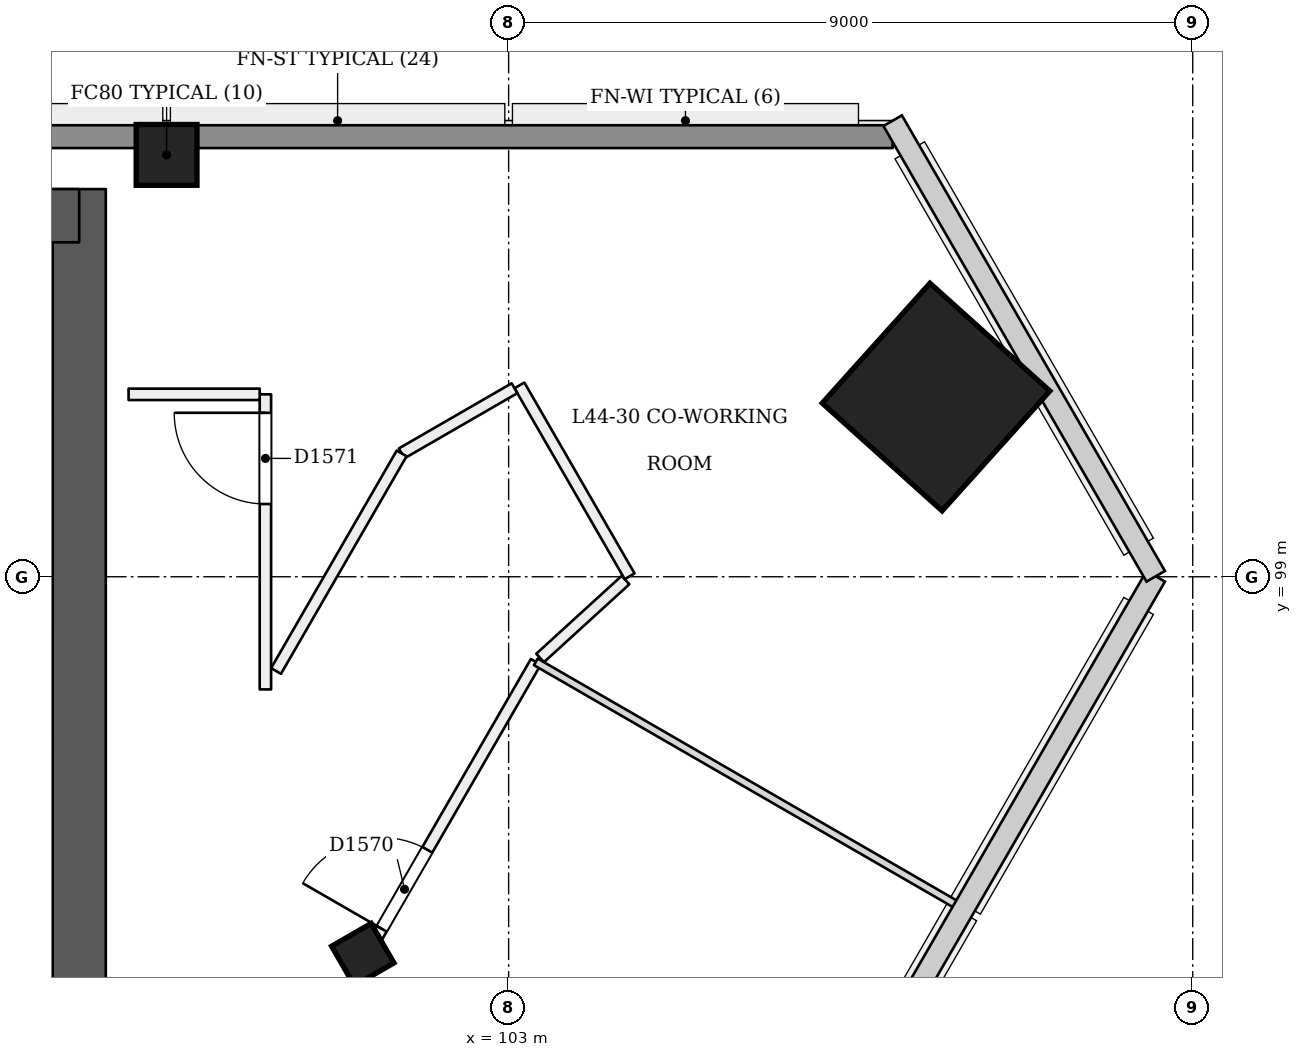
"""IFC4 building model, lengths in metres.
Left out: names, types, materials, properties, quantities, classifications, styles, units other than length and angle.
Written with IfcOpenShell. Run it as: python <this file> out.ifc"""

import sys

from ifc_helpers import new_model, si_unit, direction, frame, frame_2d, origin, origin_2d, place, context, subcontext, project, spatial, rectangle, extrude, element, fill, save


model = new_model("IFC4")
c1 = context("Model", 3, precision=1e-05, world=origin(), true_north=direction((0.0, 1.0)))
c2 = subcontext(c1, "Body", "Model", "MODEL_VIEW")
j1 = project(units=[si_unit("LENGTHUNIT", "METRE"), si_unit("PLANEANGLEUNIT", "RADIAN")], contexts=[c1])
p1 = place(None, origin())
s1 = spatial("IfcSite", under=j1, at=p1, CompositionType="ELEMENT")
p2 = place(p1, origin())
s2 = spatial("IfcBuilding", under=s1, at=p2, CompositionType="ELEMENT")
p3 = place(p2, frame((0.0, 0.0, 171.0)))
s3 = spatial("IfcBuildingStorey", under=s2, at=p3, CompositionType="ELEMENT", Elevation=171.0)
p4 = place(p3, frame((97.35, 93.05, 0.0), z_axis=(0.0, 0.0, 1.0), x_axis=(0.0, 1.0, 0.0)))
e1 = element("IfcWall", 1, at=p4, inside=s3, PredefinedType="SHEAR", context=c2, shape_type="SweptSolid", body=[
    extrude(rectangle(XDim=11.05, YDim=0.7, at=frame_2d((5.525, 0.0))), origin(), (0.0, 0.0, 1.0), 3.6),
])
p5 = place(p3, frame((97.35, 103.75, 0.0), z_axis=(0.0, 0.0, 1.0), x_axis=(-1.0, 0.0, 0.0)))
e2 = element("IfcWall", 2, at=p5, inside=s3, PredefinedType="SHEAR", context=c2, shape_type="SweptSolid", body=[
    extrude(rectangle(XDim=25.05, YDim=0.7, at=frame_2d((12.525, 0.0))), origin(), (0.0, 0.0, 1.0), 3.6),
])
p6 = place(p3, frame((101.108, 93.982, -0.018), z_axis=(-0.022153634206, 0.038480930364, 0.999013730882), x_axis=(-0.501317534198, -0.86497852137, 0.022201069202)))
e3 = element("IfcColumn", 3, at=p6, inside=s3, PredefinedType="COLUMN", context=c2, shape_type="SweptSolid", body=[
    extrude(rectangle(XDim=0.6, YDim=0.6, at=origin_2d()), origin(), (0.0, 0.0, 1.0), 3.604),
])
p7 = place(p3, frame((108.657, 101.353, 0.0), z_axis=(-0.028401796786, 0.009286506348, 0.999553449666), x_axis=(0.498881183205, -0.866385379601, 0.022224739778)))
e4 = element("IfcColumn", 4, at=p7, inside=s3, PredefinedType="COLUMN", context=c2, shape_type="SweptSolid", body=[
    extrude(rectangle(XDim=2.12, YDim=2.12, at=origin_2d()), origin(), (0.0, 0.0, 1.0), 3.602),
])
p8 = place(p3, frame((98.5, 104.55, 0.0), z_axis=(0.0, 0.0, 1.0), x_axis=(1.0, 0.0, 0.0)))
e5 = element("IfcColumn", 5, at=p8, inside=s3, PredefinedType="COLUMN", context=c2, shape_type="SweptSolid", body=[
    extrude(rectangle(XDim=0.8, YDim=0.8, at=origin_2d()), origin(), (0.0, 0.0, 1.0), 3.6),
])
p9 = place(p3, frame((99.8, 91.718, 0.0), z_axis=(0.0, 0.0, 1.0), x_axis=(0.499976887781, 0.866038747219, 0.0)))
e6 = element("IfcWall", 6, at=p9, inside=s3, PredefinedType="PARTITIONING", context=c2, shape_type="SweptSolid", body=[
    extrude(rectangle(XDim=7.115, YDim=0.15, at=frame_2d((3.558, 0.0))), origin(), (0.0, 0.0, 1.0), 2.75),
])
p10 = place(p9, frame((3.061, 0.0, 0.0)))
e7 = element("IfcOpeningElement", 7, at=p10, cuts=e6, PredefinedType="OPENING", context=c2, shape_type="SweptSolid", body=[
    extrude(rectangle(XDim=1.2, YDim=2.1, at=frame_2d((0.6, 1.05))), frame((0.0, 0.085, 0.0), z_axis=(0.0, -1.0, 0.0), x_axis=(1.0, 0.0, 0.0)), (0.0, 0.0, 1.0), 0.171),
])
p11 = place(p3, frame((103.414, 97.932, 0.0), z_axis=(0.0, 0.0, 1.0), x_axis=(0.73878425035, 0.673942008955, 0.0)))
e8 = element("IfcWall", 8, at=p11, inside=s3, PredefinedType="PARTITIONING", context=c2, shape_type="SweptSolid", body=[
    extrude(rectangle(XDim=1.521, YDim=0.15, at=frame_2d((0.761, 0.0))), origin(), (0.0, 0.0, 1.0), 3.15),
])
p12 = place(p3, frame((104.592, 99.006, 0.0), z_axis=(0.0, 0.0, 1.0), x_axis=(-0.499987231761, 0.866032775405, 0.0)))
e9 = element("IfcWall", 9, at=p12, inside=s3, PredefinedType="PARTITIONING", context=c2, shape_type="SweptSolid", body=[
    extrude(rectangle(XDim=2.9, YDim=0.15, at=frame_2d((1.45, 0.0))), origin(), (0.0, 0.0, 1.0), 3.15),
])
p13 = place(p3, frame((103.077, 101.48, 0.0), z_axis=(0.0, 0.0, 1.0), x_axis=(-0.866078867041, -0.499907387488, 0.0)))
e10 = element("IfcWall", 10, at=p13, inside=s3, PredefinedType="PARTITIONING", context=c2, shape_type="SweptSolid", body=[
    extrude(rectangle(XDim=1.714, YDim=0.15, at=frame_2d((0.857, 0.0))), origin(), (0.0, 0.0, 1.0), 3.15),
])
p14 = place(p3, frame((101.593, 100.623, 0.0), z_axis=(0.0, 0.0, 1.0), x_axis=(-0.499976073514, -0.866039217307, 0.0)))
e11 = element("IfcWall", 11, at=p14, inside=s3, PredefinedType="PARTITIONING", context=c2, shape_type="SweptSolid", body=[
    extrude(rectangle(XDim=3.305, YDim=0.15, at=frame_2d((1.653, 0.0))), origin(), (0.0, 0.0, 1.0), 3.15),
])
p15 = place(p3, frame((99.8, 97.518, 0.0), z_axis=(0.0, 0.0, 1.0), x_axis=(0.0, 1.0, 0.0)))
e12 = element("IfcWall", 12, at=p15, inside=s3, PredefinedType="PARTITIONING", context=c2, shape_type="SweptSolid", body=[
    extrude(rectangle(XDim=3.882, YDim=0.15, at=frame_2d((1.941, 0.0))), origin(), (0.0, 0.0, 1.0), 3.15),
])
p16 = place(p15, frame((2.439, 0.0, 0.0)))
e13 = element("IfcOpeningElement", 13, at=p16, cuts=e12, PredefinedType="OPENING", context=c2, shape_type="SweptSolid", body=[
    extrude(rectangle(XDim=1.2, YDim=2.1, at=frame_2d((0.6, 1.05))), frame((0.0, 0.085, 0.0), z_axis=(0.0, -1.0, 0.0), x_axis=(1.0, 0.0, 0.0)), (0.0, 0.0, 1.0), 0.171),
])
p17 = place(p3, frame((99.725, 101.4, 0.0), z_axis=(0.0, 0.0, 1.0), x_axis=(-1.0, 0.0, 0.0)))
e14 = element("IfcWall", 14, at=p17, inside=s3, PredefinedType="PARTITIONING", context=c2, shape_type="SweptSolid", body=[
    extrude(rectangle(XDim=1.725, YDim=0.15, at=frame_2d((0.863, 0.0))), origin(), (0.0, 0.0, 1.0), 3.15),
])
p18 = place(p3, frame((108.918, 94.67, 0.0), z_axis=(0.0, 0.0, 1.0), x_axis=(-0.866018406147, 0.500012120068, 0.0)))
e15 = element("IfcWall", 15, at=p18, inside=s3, PredefinedType="PARTITIONING", context=c2, shape_type="SweptSolid", body=[
    extrude(rectangle(XDim=6.42, YDim=0.1, at=frame_2d((3.21, 0.0))), origin(), (0.0, 0.0, 1.0), 2.65),
])
p19 = place(p3, frame((61.947, 104.79, 0.0), z_axis=(0.0, 0.0, 1.0), x_axis=(1.0, 0.0, 0.0)))
e16 = element("IfcWall", 16, at=p19, inside=s3, PredefinedType="SOLIDWALL", context=c2, shape_type="SweptSolid", body=[
    extrude(rectangle(XDim=46.105, YDim=0.3, at=frame_2d((23.053, 0.0))), origin(), (0.0, 0.0, 1.0), 2.65),
])
p20 = place(p10, origin())
e17 = element("IfcDoor", 17, at=p20, inside=s3, OperationType="SINGLE_SWING_LEFT", PredefinedType="NOTDEFINED", context=c2, shape_type="SweptSolid", body=[
    extrude(rectangle(XDim=1.2, YDim=2.1, at=frame_2d((0.6, 1.05))), frame((0.0, 0.025, 0.0), z_axis=(0.0, -1.0, 0.0), x_axis=(1.0, 0.0, 0.0)), (0.0, 0.0, 1.0), 0.05),
])
fill(e7, e17)
p21 = place(p16, origin())
e18 = element("IfcDoor", 18, at=p21, inside=s3, OperationType="SINGLE_SWING_RIGHT", PredefinedType="NOTDEFINED", context=c2, shape_type="SweptSolid", body=[
    extrude(rectangle(XDim=1.2, YDim=2.1, at=frame_2d((0.6, 1.05))), frame((0.0, 0.025, 0.0), z_axis=(0.0, -1.0, 0.0), x_axis=(1.0, 0.0, 0.0)), (0.0, 0.0, 1.0), 0.05),
])
fill(e13, e18)
save(model, sys.argv[1])
